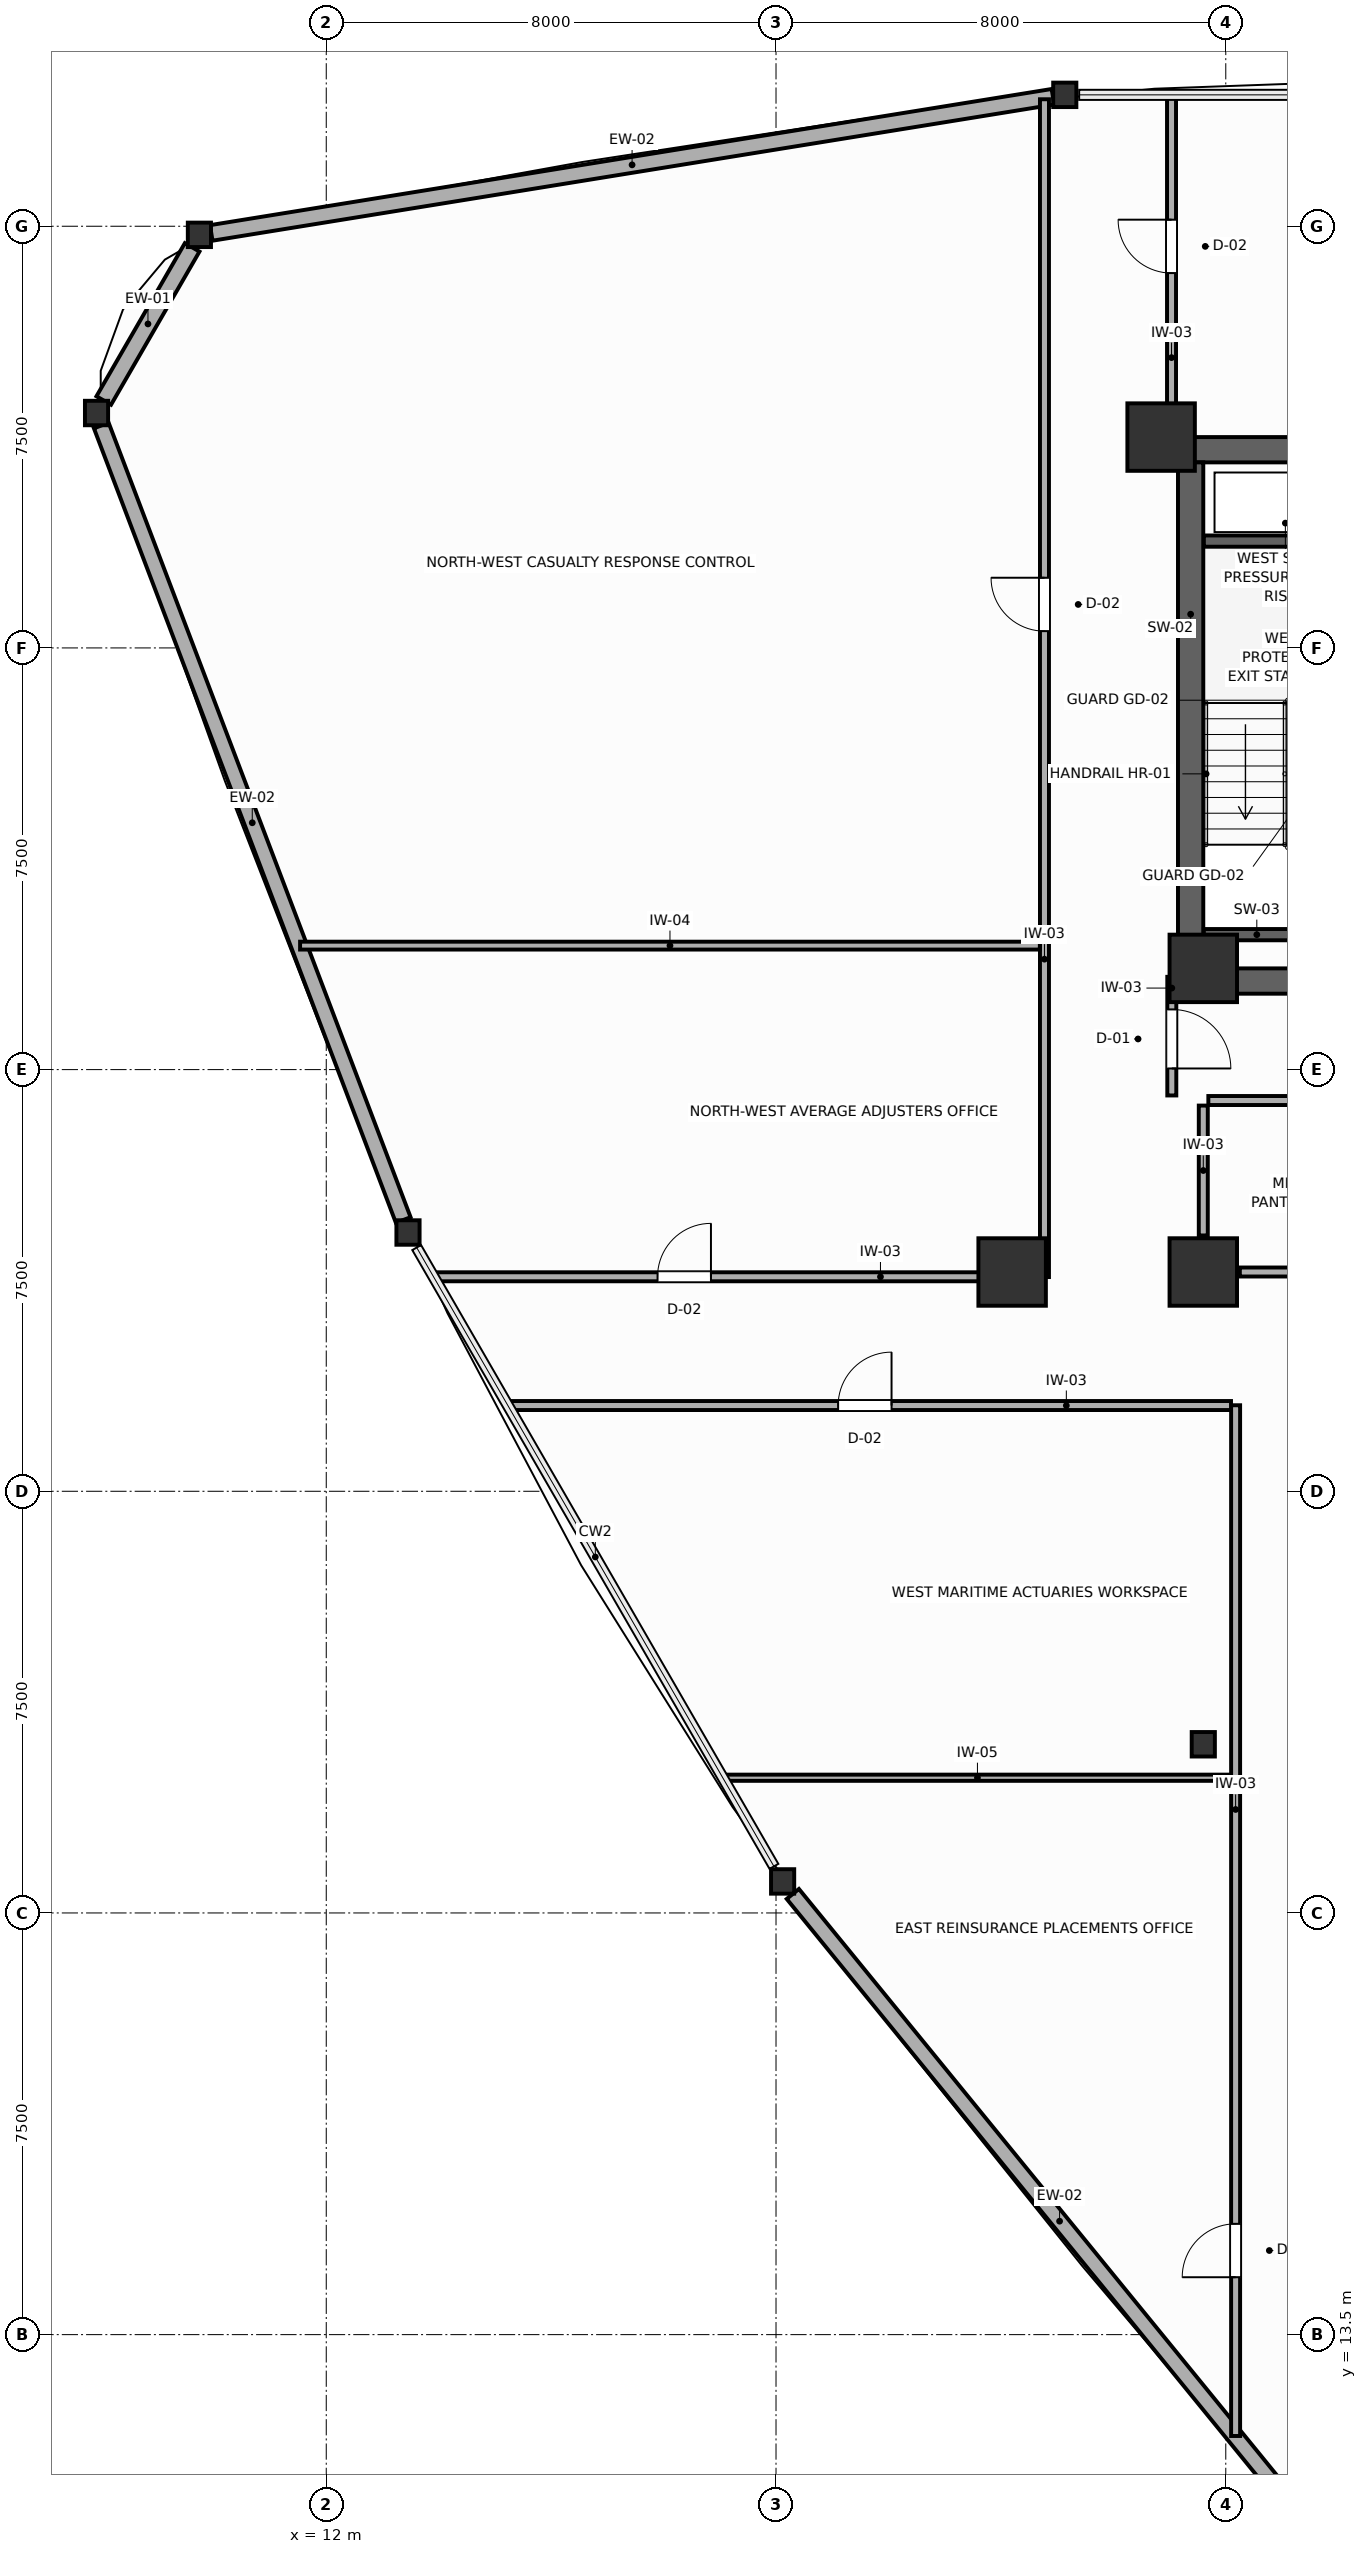
"""IFC4 building model, lengths in metres.
Left out: names, types, materials, properties, quantities, classifications, styles, units other than length and angle.
Written with IfcOpenShell. Run it as: python <this file> out.ifc"""

import sys

from ifc_helpers import new_model, si_unit, direction, frame, frame_2d, origin, origin_2d, place, context, subcontext, project, spatial, rectangle, i_section, extrude, source, transform, mapped, element, fill, save


model = new_model("IFC4")
c1 = context("Model", 3, precision=1e-05, world=origin(), true_north=direction((0.0, 1.0)))
c2 = subcontext(c1, "Body", "Model", "MODEL_VIEW")
j1 = project(units=[si_unit("LENGTHUNIT", "METRE"), si_unit("PLANEANGLEUNIT", "RADIAN")], contexts=[c1])
p1 = place(None, origin())
s1 = spatial("IfcSite", under=j1, at=p1, CompositionType="ELEMENT")
p2 = place(p1, origin())
s2 = spatial("IfcBuilding", under=s1, at=p2, CompositionType="ELEMENT")
p3 = place(p2, frame((0.0, 0.0, 143.4)))
s3 = spatial("IfcBuildingStorey", under=s2, at=p3, CompositionType="ELEMENT", Elevation=143.4)
p4 = place(p3, frame((27.15, 47.025, 0.0), z_axis=(0.0, 0.0, 1.0), x_axis=(1.0, 0.0, 0.0)))
e1 = element("IfcWall", 1, at=p4, inside=s3, PredefinedType="SHEAR", context=c2, shape_type="SweptSolid", body=[
    extrude(rectangle(XDim=17.7, YDim=0.45, at=frame_2d((8.85, 0.0))), origin(), (0.0, 0.0, 1.0), 3.6),
])
p5 = place(p3, frame((27.15, 37.575, 0.0), z_axis=(0.0, 0.0, 1.0), x_axis=(1.0, 0.0, 0.0)))
e2 = element("IfcWall", 2, at=p5, inside=s3, PredefinedType="SHEAR", context=c2, shape_type="SweptSolid", body=[
    extrude(rectangle(XDim=17.7, YDim=0.45, at=frame_2d((8.85, 0.0))), origin(), (0.0, 0.0, 1.0), 3.6),
])
p6 = place(p5, frame((4.875, 0.0, 0.0)))
e3 = element("IfcOpeningElement", 3, at=p6, cuts=e2, PredefinedType="OPENING", context=c2, shape_type="SweptSolid", body=[
    extrude(rectangle(XDim=1.05, YDim=2.1, at=frame_2d((0.525, 1.05))), frame((0.0, 0.235, 0.0), z_axis=(0.0, -1.0, 0.0), x_axis=(1.0, 0.0, 0.0)), (0.0, 0.0, 1.0), 0.47),
])
p7 = place(p5, frame((11.775, 0.0, 0.0)))
e4 = element("IfcOpeningElement", 4, at=p7, cuts=e2, PredefinedType="OPENING", context=c2, shape_type="SweptSolid", body=[
    extrude(rectangle(XDim=1.05, YDim=2.1, at=frame_2d((0.525, 1.05))), frame((0.0, 0.235, 0.0), z_axis=(0.0, -1.0, 0.0), x_axis=(1.0, 0.0, 0.0)), (0.0, 0.0, 1.0), 0.47),
])
p8 = place(p3, frame((27.375, 37.8, 0.0), z_axis=(0.0, 0.0, 1.0), x_axis=(0.0, 1.0, 0.0)))
e5 = element("IfcWall", 5, at=p8, inside=s3, PredefinedType="SHEAR", context=c2, shape_type="SweptSolid", body=[
    extrude(rectangle(XDim=9.0, YDim=0.45, at=frame_2d((4.5, 0.0))), origin(), (0.0, 0.0, 1.0), 3.6),
])
m1 = source(origin(), c2, "Body", "SweptSolid", [
    extrude(rectangle(XDim=1.2, YDim=1.2, at=origin_2d()), origin(), (0.0, 0.0, 1.0), 3.6),
])
for number, where, z_axis, x_axis in (
    (6, (26.85, 47.25, 0.0), (0.0, 0.0, 1.0), (1.0, 0.0, 0.0)),
    (7, (27.6, 37.8, 0.0), (0.0, 0.0, 1.0), (1.0, 0.0, 0.0)),
    (8, (27.6, 32.4, 0.0), (0.0, 0.0, 1.0), (1.0, 0.0, 0.0)),
    (9, (24.2, 32.4, 0.0), (0.0, 0.0, 1.0), (1.0, 0.0, 0.0)),
):
    element("IfcColumn", number, at=place(p3, frame(where, z_axis=z_axis, x_axis=x_axis)), inside=s3, PredefinedType="COLUMN", context=c2, shape_type="MappedRepresentation", body=[
        mapped(m1, transform((0.0, 0.0, 0.0), scale=1.0)),
    ])
m2 = source(origin(), c2, "Body", "SweptSolid", [
    extrude(i_section(OverallWidth=0.412, OverallDepth=0.435, WebThickness=0.033, FlangeThickness=0.053, FilletRadius=0.015, at=origin_2d()), origin(), (0.0, 0.0, 1.0), 3.6),
])
for number, where, z_axis, x_axis in (
    (10, (27.6, 24.0, 0.0), (0.0, 0.0, 1.0), (1.0, 0.0, 0.0)),
    (11, (25.136, 53.337, 0.0), (0.0, 0.0, 1.0), (1.0, 0.0, 0.0)),
    (12, (9.743, 50.847, 0.0), (0.0, 0.0, 1.0), (1.0, 0.0, 0.0)),
    (13, (7.914, 47.678, 0.0), (0.0, 0.0, 1.0), (1.0, 0.0, 0.0)),
    (14, (13.454, 33.103, 0.0), (0.0, 0.0, 1.0), (1.0, 0.0, 0.0)),
    (15, (20.118, 21.561, 0.0), (0.0, 0.0, 1.0), (1.0, 0.0, 0.0)),
):
    element("IfcColumn", number, at=place(p3, frame(where, z_axis=z_axis, x_axis=x_axis)), inside=s3, PredefinedType="COLUMN", context=c2, shape_type="MappedRepresentation", body=[
        mapped(m2, transform((0.0, 0.0, 0.0), scale=1.0)),
    ])
p9 = place(p3, frame((24.925, 53.303, 0.0), z_axis=(0.0, 0.0, 1.0), x_axis=(-0.987165905884, -0.159698072185, 0.0)))
e16 = element("IfcWall", 16, at=p9, inside=s3, PredefinedType="SOLIDWALL", context=c2, shape_type="SweptSolid", body=[
    extrude(rectangle(XDim=15.165, YDim=0.28, at=frame_2d((7.583, 0.0))), origin(), (0.0, 0.0, 1.0), 1.87),
])
p10 = place(p3, frame((9.615, 50.625, 0.0), z_axis=(0.0, 0.0, 1.0), x_axis=(-0.499995674689, -0.86602790099, 0.0)))
e17 = element("IfcWall", 17, at=p10, inside=s3, PredefinedType="SOLIDWALL", context=c2, shape_type="SweptSolid", body=[
    extrude(rectangle(XDim=3.146, YDim=0.3, at=frame_2d((1.573, 0.0))), origin(), (0.0, 0.0, 1.0), 1.87),
])
p11 = place(p3, frame((7.998, 47.456, 0.0), z_axis=(0.0, 0.0, 1.0), x_axis=(0.355302150634, -0.934751508025, 0.0)))
e18 = element("IfcWall", 18, at=p11, inside=s3, PredefinedType="SOLIDWALL", context=c2, shape_type="SweptSolid", body=[
    extrude(rectangle(XDim=15.117, YDim=0.28, at=frame_2d((7.559, 0.0))), origin(), (0.0, 0.0, 1.0), 1.87),
])
p12 = place(p3, frame((20.299, 21.338, 0.0), z_axis=(0.0, 0.0, 1.0), x_axis=(0.631872666528, -0.775072211665, 0.0)))
e19 = element("IfcWall", 19, at=p12, inside=s3, PredefinedType="SOLIDWALL", context=c2, shape_type="SweptSolid", body=[
    extrude(rectangle(XDim=15.019, YDim=0.28, at=frame_2d((7.509, 0.0))), origin(), (0.0, 0.0, 1.0), 1.87),
])
for number, where, z_axis, x_axis in (
    (20, (27.61, 45.4, 0.0), (0.0, 0.0, 1.0), (1.0, 0.0, 0.0)),
    (21, (27.61, 38.4, 0.0), (0.0, 0.0, 1.0), (1.0, 0.0, 0.0)),
):
    element("IfcWall", number, at=place(p3, frame(where, z_axis=z_axis, x_axis=x_axis)), inside=s3, PredefinedType="SHEAR", context=c2, shape_type="SweptSolid", body=[
        extrude(rectangle(XDim=3.14, YDim=0.2, at=frame_2d((1.57, 0.0))), origin(), (0.0, 0.0, 1.0), 3.6),
    ])
p13 = place(p3, frame((28.25, 32.4, 0.0), z_axis=(0.0, 0.0, 1.0), x_axis=(1.0, 0.0, 0.0)))
e22 = element("IfcWall", 22, at=p13, inside=s3, PredefinedType="PARTITIONING", context=c2, shape_type="SweptSolid", body=[
    extrude(rectangle(XDim=3.45, YDim=0.16, at=frame_2d((1.725, 0.0))), origin(), (0.0, 0.0, 1.0), 2.16),
])
p14 = place(p3, frame((27.6, 33.05, 0.0), z_axis=(0.0, 0.0, 1.0), x_axis=(0.0, 1.0, 0.0)))
e23 = element("IfcWall", 23, at=p14, inside=s3, PredefinedType="PARTITIONING", context=c2, shape_type="SweptSolid", body=[
    extrude(rectangle(XDim=2.31, YDim=0.16, at=frame_2d((1.155, 0.0))), origin(), (0.0, 0.0, 1.0), 3.4),
])
p15 = place(p3, frame((27.69, 35.45, 0.0), z_axis=(0.0, 0.0, 1.0), x_axis=(1.0, 0.0, 0.0)))
e24 = element("IfcWall", 24, at=p15, inside=s3, PredefinedType="PARTITIONING", context=c2, shape_type="SweptSolid", body=[
    extrude(rectangle(XDim=4.01, YDim=0.16, at=frame_2d((2.005, 0.0))), origin(), (0.0, 0.0, 1.0), 3.4),
])
p16 = place(p15, frame((1.45, 0.0, 0.0)))
e25 = element("IfcOpeningElement", 25, at=p16, cuts=e24, PredefinedType="OPENING", context=c2, shape_type="SweptSolid", body=[
    extrude(rectangle(XDim=0.95, YDim=2.05, at=frame_2d((0.475, 1.025))), frame((0.0, 0.09, 0.0), z_axis=(0.0, -1.0, 0.0), x_axis=(1.0, 0.0, 0.0)), (0.0, 0.0, 1.0), 0.18),
])
p17 = place(p3, frame((27.04, 35.54, 0.0), z_axis=(0.0, 0.0, 1.0), x_axis=(0.0, 1.0, 0.0)))
e26 = element("IfcWall", 26, at=p17, inside=s3, PredefinedType="PARTITIONING", context=c2, shape_type="SweptSolid", body=[
    extrude(rectangle(XDim=2.11, YDim=0.16, at=frame_2d((1.055, 0.0))), origin(), (0.0, 0.0, 1.0), 3.4),
])
p18 = place(p17, frame((0.48, 0.0, 0.0)))
e27 = element("IfcOpeningElement", 27, at=p18, cuts=e26, PredefinedType="OPENING", context=c2, shape_type="SweptSolid", body=[
    extrude(rectangle(XDim=1.05, YDim=2.1, at=frame_2d((0.525, 1.05))), frame((0.0, 0.09, 0.0), z_axis=(0.0, -1.0, 0.0), x_axis=(1.0, 0.0, 0.0)), (0.0, 0.0, 1.0), 0.18),
])
p19 = place(p3, frame((24.775, 32.31, 0.0), z_axis=(0.0, 0.0, 1.0), x_axis=(0.0, 1.0, 0.0)))
e28 = element("IfcWall", 28, at=p19, inside=s3, PredefinedType="PARTITIONING", context=c2, shape_type="SweptSolid", body=[
    extrude(rectangle(XDim=20.948, YDim=0.16, at=frame_2d((10.474, 0.0))), origin(), (0.0, 0.0, 1.0), 3.4),
])
p20 = place(p19, frame((11.488, 0.0, 0.0)))
e29 = element("IfcOpeningElement", 29, at=p20, cuts=e28, PredefinedType="OPENING", context=c2, shape_type="SweptSolid", body=[
    extrude(rectangle(XDim=0.95, YDim=2.05, at=frame_2d((0.475, 1.025))), frame((0.0, 0.09, 0.0), z_axis=(0.0, -1.0, 0.0), x_axis=(1.0, 0.0, 0.0)), (0.0, 0.0, 1.0), 0.18),
])
p21 = place(p3, frame((28.175, 11.697, 0.0), z_axis=(0.0, 0.0, 1.0), x_axis=(0.0, 1.0, 0.0)))
e30 = element("IfcWall", 30, at=p21, inside=s3, PredefinedType="PARTITIONING", context=c2, shape_type="SweptSolid", body=[
    extrude(rectangle(XDim=18.333, YDim=0.16, at=frame_2d((9.167, 0.0))), origin(), (0.0, 0.0, 1.0), 3.4),
])
p22 = place(p21, frame((2.824, 0.0, 0.0)))
e31 = element("IfcOpeningElement", 31, at=p22, cuts=e30, PredefinedType="OPENING", context=c2, shape_type="SweptSolid", body=[
    extrude(rectangle(XDim=0.95, YDim=2.05, at=frame_2d((0.475, 1.025))), frame((0.0, 0.09, 0.0), z_axis=(0.0, -1.0, 0.0), x_axis=(1.0, 0.0, 0.0)), (0.0, 0.0, 1.0), 0.18),
])
p23 = place(p3, frame((15.251, 30.025, 0.0), z_axis=(0.0, 0.0, 1.0), x_axis=(1.0, 0.0, 0.0)))
e32 = element("IfcWall", 32, at=p23, inside=s3, PredefinedType="PARTITIONING", context=c2, shape_type="SweptSolid", body=[
    extrude(rectangle(XDim=12.842, YDim=0.16, at=frame_2d((6.421, 0.0))), origin(), (0.0, 0.0, 1.0), 3.4),
])
p24 = place(p23, frame((5.854, 0.0, 0.0)))
e33 = element("IfcOpeningElement", 33, at=p24, cuts=e32, PredefinedType="OPENING", context=c2, shape_type="SweptSolid", body=[
    extrude(rectangle(XDim=0.95, YDim=2.05, at=frame_2d((0.475, 1.025))), frame((0.0, 0.09, 0.0), z_axis=(0.0, -1.0, 0.0), x_axis=(1.0, 0.0, 0.0)), (0.0, 0.0, 1.0), 0.18),
])
p25 = place(p3, frame((13.929, 32.315, 0.0), z_axis=(0.0, 0.0, 1.0), x_axis=(1.0, 0.0, 0.0)))
e34 = element("IfcWall", 34, at=p25, inside=s3, PredefinedType="PARTITIONING", context=c2, shape_type="SweptSolid", body=[
    extrude(rectangle(XDim=10.764, YDim=0.16, at=frame_2d((5.382, 0.0))), origin(), (0.0, 0.0, 1.0), 2.16),
])
p26 = place(p25, frame((3.964, 0.0, 0.0)))
e35 = element("IfcOpeningElement", 35, at=p26, cuts=e34, PredefinedType="OPENING", context=c2, shape_type="SweptSolid", body=[
    extrude(rectangle(XDim=0.95, YDim=2.05, at=frame_2d((0.475, 1.025))), frame((0.0, 0.09, 0.0), z_axis=(0.0, -1.0, 0.0), x_axis=(1.0, 0.0, 0.0)), (0.0, 0.0, 1.0), 0.18),
])
p27 = place(p3, frame((27.035, 47.34, 0.0), z_axis=(0.0, 0.0, 1.0), x_axis=(0.0, 1.0, 0.0)))
e36 = element("IfcWall", 36, at=p27, inside=s3, PredefinedType="PARTITIONING", context=c2, shape_type="SweptSolid", body=[
    extrude(rectangle(XDim=5.977, YDim=0.16, at=frame_2d((2.988, 0.0))), origin(), (0.0, 0.0, 1.0), 2.16),
])
p28 = place(p27, frame((2.827, 0.0, 0.0)))
e37 = element("IfcOpeningElement", 37, at=p28, cuts=e36, PredefinedType="OPENING", context=c2, shape_type="SweptSolid", body=[
    extrude(rectangle(XDim=0.95, YDim=2.05, at=frame_2d((0.475, 1.025))), frame((0.0, 0.09, 0.0), z_axis=(0.0, -1.0, 0.0), x_axis=(1.0, 0.0, 0.0)), (0.0, 0.0, 1.0), 0.18),
])
p29 = place(p3, frame((11.534, 38.205, 0.0), z_axis=(0.0, 0.0, 1.0), x_axis=(1.0, 0.0, 0.0)))
e38 = element("IfcWall", 38, at=p29, inside=s3, PredefinedType="PARTITIONING", context=c2, shape_type="SweptSolid", body=[
    extrude(rectangle(XDim=13.159, YDim=0.14, at=frame_2d((6.579, 0.0))), origin(), (0.0, 0.0, 1.0), 3.4),
])
p30 = place(p3, frame((19.073, 23.405, 0.0), z_axis=(0.0, 0.0, 1.0), x_axis=(1.0, 0.0, 0.0)))
e39 = element("IfcWall", 39, at=p30, inside=s3, PredefinedType="MOVABLE", context=c2, shape_type="SweptSolid", body=[
    extrude(rectangle(XDim=9.02, YDim=0.11, at=frame_2d((4.51, 0.0))), origin(), (0.0, 0.0, 1.0), 3.4),
])
p31 = place(p18, frame((1.05, 0.0, 0.0), z_axis=(0.0, 0.0, 1.0), x_axis=(-1.0, 0.0, 0.0)))
e40 = element("IfcDoor", 40, at=p31, inside=s3, OperationType="SINGLE_SWING_RIGHT", PredefinedType="DOOR", context=c2, shape_type="SweptSolid", body=[
    extrude(rectangle(XDim=1.05, YDim=2.1, at=frame_2d((0.525, 1.05))), frame((0.0, 0.025, 0.0), z_axis=(0.0, -1.0, 0.0), x_axis=(1.0, 0.0, 0.0)), (0.0, 0.0, 1.0), 0.05),
])
fill(e27, e40)
p32 = place(p20, origin())
e41 = element("IfcDoor", 41, at=p32, inside=s3, OperationType="SINGLE_SWING_RIGHT", PredefinedType="DOOR", context=c2, shape_type="SweptSolid", body=[
    extrude(rectangle(XDim=0.95, YDim=2.05, at=frame_2d((0.475, 1.025))), frame((0.0, 0.025, 0.0), z_axis=(0.0, -1.0, 0.0), x_axis=(1.0, 0.0, 0.0)), (0.0, 0.0, 1.0), 0.05),
])
fill(e29, e41)
p33 = place(p22, origin())
e42 = element("IfcDoor", 42, at=p33, inside=s3, OperationType="SINGLE_SWING_LEFT", PredefinedType="DOOR", context=c2, shape_type="SweptSolid", body=[
    extrude(rectangle(XDim=0.95, YDim=2.05, at=frame_2d((0.475, 1.025))), frame((0.0, 0.025, 0.0), z_axis=(0.0, -1.0, 0.0), x_axis=(1.0, 0.0, 0.0)), (0.0, 0.0, 1.0), 0.05),
])
fill(e31, e42)
p34 = place(p24, origin())
e43 = element("IfcDoor", 43, at=p34, inside=s3, OperationType="SINGLE_SWING_RIGHT", PredefinedType="DOOR", context=c2, shape_type="SweptSolid", body=[
    extrude(rectangle(XDim=0.95, YDim=2.05, at=frame_2d((0.475, 1.025))), frame((0.0, 0.025, 0.0), z_axis=(0.0, -1.0, 0.0), x_axis=(1.0, 0.0, 0.0)), (0.0, 0.0, 1.0), 0.05),
])
fill(e33, e43)
p35 = place(p26, origin())
e44 = element("IfcDoor", 44, at=p35, inside=s3, OperationType="SINGLE_SWING_RIGHT", PredefinedType="DOOR", context=c2, shape_type="SweptSolid", body=[
    extrude(rectangle(XDim=0.95, YDim=2.05, at=frame_2d((0.475, 1.025))), frame((0.0, 0.025, 0.0), z_axis=(0.0, -1.0, 0.0), x_axis=(1.0, 0.0, 0.0)), (0.0, 0.0, 1.0), 0.05),
])
fill(e35, e44)
p36 = place(p28, origin())
e45 = element("IfcDoor", 45, at=p36, inside=s3, OperationType="SINGLE_SWING_RIGHT", PredefinedType="DOOR", context=c2, shape_type="SweptSolid", body=[
    extrude(rectangle(XDim=0.95, YDim=2.05, at=frame_2d((0.475, 1.025))), frame((0.0, 0.025, 0.0), z_axis=(0.0, -1.0, 0.0), x_axis=(1.0, 0.0, 0.0)), (0.0, 0.0, 1.0), 0.05),
])
fill(e37, e45)
save(model, sys.argv[1])
